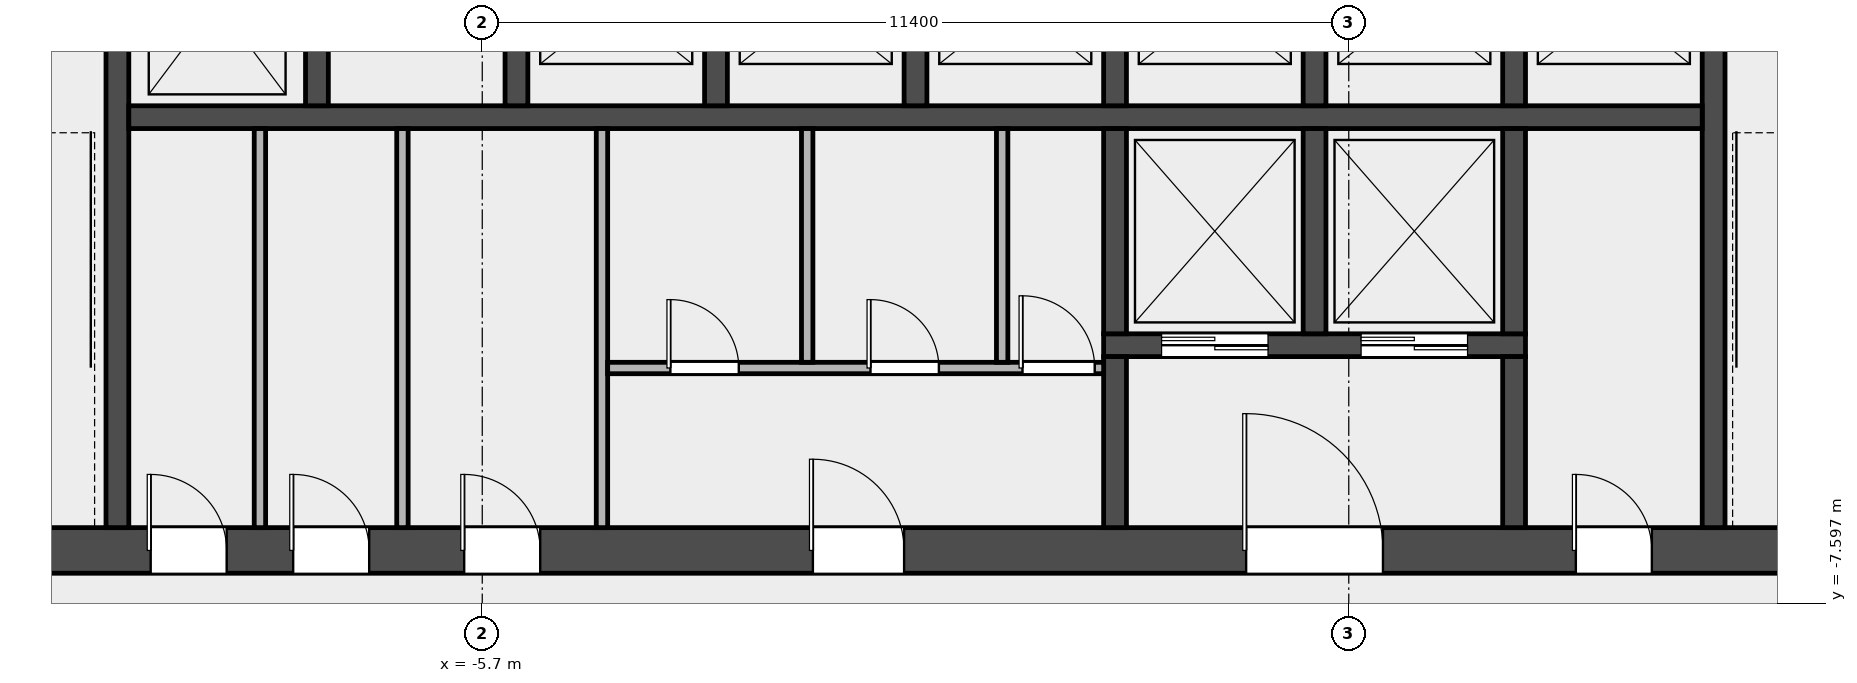
"""IFC4 building model, lengths in metres.
Left out: names, types, materials, properties, quantities, classifications, styles, units other than length and angle.
Written with IfcOpenShell. Run it as: python <this file> out.ifc"""

import sys

from ifc_helpers import new_model, si_unit, direction, frame, frame_2d, origin, place, context, subcontext, project, spatial, rectangle, extrude, element, fill, save


model = new_model("IFC4")
c1 = context("Model", 3, precision=1e-05, world=origin(), true_north=direction((0.0, 1.0)))
c2 = subcontext(c1, "Body", "Model", "MODEL_VIEW")
j1 = project(units=[si_unit("LENGTHUNIT", "METRE"), si_unit("PLANEANGLEUNIT", "RADIAN")], contexts=[c1])
p1 = place(None, origin())
s1 = spatial("IfcSite", under=j1, at=p1, CompositionType="ELEMENT")
p2 = place(p1, origin())
s2 = spatial("IfcBuilding", under=s1, at=p2, CompositionType="ELEMENT")
p3 = place(p2, frame((0.0, 0.0, 201.0)))
s3 = spatial("IfcBuildingStorey", under=s2, at=p3, CompositionType="ELEMENT", Elevation=201.0)
p4 = place(p3, frame((-14.4, -6.9, 0.0), z_axis=(0.0, 0.0, 1.0), x_axis=(1.0, 0.0, 0.0)))
e1 = element("IfcWall", 1, at=p4, inside=s3, PredefinedType="SHEAR", context=c2, shape_type="SweptSolid", body=[
    extrude(rectangle(XDim=28.8, YDim=0.6, at=frame_2d((14.4, 0.0))), origin(), (0.0, 0.0, 1.0), 3.7),
])
p5 = place(p4, frame((4.337, 0.0, 0.0)))
e2 = element("IfcOpeningElement", 2, at=p5, cuts=e1, PredefinedType="OPENING", context=c2, shape_type="SweptSolid", body=[
    extrude(rectangle(XDim=1.0, YDim=2.1, at=frame_2d((0.5, 1.05))), frame((0.0, 0.312, 0.0), z_axis=(0.0, -1.0, 0.0), x_axis=(1.0, 0.0, 0.0)), (0.0, 0.0, 1.0), 0.624),
])
p6 = place(p4, frame((6.212, 0.0, 0.0)))
e3 = element("IfcOpeningElement", 3, at=p6, cuts=e1, PredefinedType="OPENING", context=c2, shape_type="SweptSolid", body=[
    extrude(rectangle(XDim=1.0, YDim=2.1, at=frame_2d((0.5, 1.05))), frame((0.0, 0.312, 0.0), z_axis=(0.0, -1.0, 0.0), x_axis=(1.0, 0.0, 0.0)), (0.0, 0.0, 1.0), 0.624),
])
p7 = place(p4, frame((8.462, 0.0, 0.0)))
e4 = element("IfcOpeningElement", 4, at=p7, cuts=e1, PredefinedType="OPENING", context=c2, shape_type="SweptSolid", body=[
    extrude(rectangle(XDim=1.0, YDim=2.1, at=frame_2d((0.5, 1.05))), frame((0.0, 0.312, 0.0), z_axis=(0.0, -1.0, 0.0), x_axis=(1.0, 0.0, 0.0)), (0.0, 0.0, 1.0), 0.624),
])
p8 = place(p4, frame((13.05, 0.0, 0.0)))
e5 = element("IfcOpeningElement", 5, at=p8, cuts=e1, PredefinedType="OPENING", context=c2, shape_type="SweptSolid", body=[
    extrude(rectangle(XDim=1.2, YDim=2.1, at=frame_2d((0.6, 1.05))), frame((0.0, 0.312, 0.0), z_axis=(0.0, -1.0, 0.0), x_axis=(1.0, 0.0, 0.0)), (0.0, 0.0, 1.0), 0.624),
])
p9 = place(p4, frame((18.75, 0.0, 0.0)))
e6 = element("IfcOpeningElement", 6, at=p9, cuts=e1, PredefinedType="OPENING", context=c2, shape_type="SweptSolid", body=[
    extrude(rectangle(XDim=1.8, YDim=2.1, at=frame_2d((0.9, 1.05))), frame((0.0, 0.312, 0.0), z_axis=(0.0, -1.0, 0.0), x_axis=(1.0, 0.0, 0.0)), (0.0, 0.0, 1.0), 0.624),
])
p10 = place(p4, frame((23.087, 0.0, 0.0)))
e7 = element("IfcOpeningElement", 7, at=p10, cuts=e1, PredefinedType="OPENING", context=c2, shape_type="SweptSolid", body=[
    extrude(rectangle(XDim=1.0, YDim=2.1, at=frame_2d((0.5, 1.05))), frame((0.0, 0.312, 0.0), z_axis=(0.0, -1.0, 0.0), x_axis=(1.0, 0.0, 0.0)), (0.0, 0.0, 1.0), 0.624),
])
for number, where, z_axis, x_axis in (
    (8, (-10.5, -6.6, 0.0), (0.0, 0.0, 1.0), (0.0, 1.0, 0.0)),
    (9, (10.5, -6.6, 0.0), (0.0, 0.0, 1.0), (0.0, 1.0, 0.0)),
):
    element("IfcWall", number, at=place(p3, frame(where, z_axis=z_axis, x_axis=x_axis)), inside=s3, PredefinedType="SHEAR", context=c2, shape_type="SweptSolid", body=[
        extrude(rectangle(XDim=8.55, YDim=0.3, at=frame_2d((4.275, 0.0))), origin(), (0.0, 0.0, 1.0), 3.7),
    ])
p11 = place(p3, frame((-10.35, -1.2, 0.0), z_axis=(0.0, 0.0, 1.0), x_axis=(1.0, 0.0, 0.0)))
e10 = element("IfcWall", 10, at=p11, inside=s3, PredefinedType="SOLIDWALL", context=c2, shape_type="SweptSolid", body=[
    extrude(rectangle(XDim=20.7, YDim=0.3, at=frame_2d((10.35, 0.0))), origin(), (0.0, 0.0, 1.0), 3.7),
])
for number, where, z_axis, x_axis in (
    (11, (-7.875, -1.05, 0.0), (0.0, 0.0, 1.0), (0.0, 1.0, 0.0)),
    (12, (-5.25, -1.05, 0.0), (0.0, 0.0, 1.0), (0.0, 1.0, 0.0)),
    (13, (-2.625, -1.05, 0.0), (0.0, 0.0, 1.0), (0.0, 1.0, 0.0)),
    (14, (0.0, -1.05, 0.0), (0.0, 0.0, 1.0), (0.0, 1.0, 0.0)),
    (15, (2.625, -1.05, 0.0), (0.0, 0.0, 1.0), (0.0, 1.0, 0.0)),
    (16, (5.25, -1.05, 0.0), (0.0, 0.0, 1.0), (0.0, 1.0, 0.0)),
    (17, (7.875, -1.05, 0.0), (0.0, 0.0, 1.0), (0.0, 1.0, 0.0)),
):
    element("IfcWall", number, at=place(p3, frame(where, z_axis=z_axis, x_axis=x_axis)), inside=s3, PredefinedType="SOLIDWALL", context=c2, shape_type="SweptSolid", body=[
        extrude(rectangle(XDim=2.7, YDim=0.3, at=frame_2d((1.35, 0.0))), origin(), (0.0, 0.0, 1.0), 3.7),
    ])
p12 = place(p3, frame((2.475, -4.2, 0.0), z_axis=(0.0, 0.0, 1.0), x_axis=(1.0, 0.0, 0.0)))
e18 = element("IfcWall", 18, at=p12, inside=s3, PredefinedType="SOLIDWALL", context=c2, shape_type="SweptSolid", body=[
    extrude(rectangle(XDim=5.55, YDim=0.3, at=frame_2d((2.775, 0.0))), origin(), (0.0, 0.0, 1.0), 3.7),
])
p13 = place(p12, frame((0.762, 0.0, 0.0)))
e19 = element("IfcOpeningElement", 19, at=p13, cuts=e18, PredefinedType="OPENING", context=c2, shape_type="SweptSolid", body=[
    extrude(rectangle(XDim=1.4, YDim=2.1, at=frame_2d((0.7, 1.05))), frame((0.0, 0.162, 0.0), z_axis=(0.0, -1.0, 0.0), x_axis=(1.0, 0.0, 0.0)), (0.0, 0.0, 1.0), 0.324),
])
p14 = place(p12, frame((3.387, 0.0, 0.0)))
e20 = element("IfcOpeningElement", 20, at=p14, cuts=e18, PredefinedType="OPENING", context=c2, shape_type="SweptSolid", body=[
    extrude(rectangle(XDim=1.4, YDim=2.1, at=frame_2d((0.7, 1.05))), frame((0.0, 0.162, 0.0), z_axis=(0.0, -1.0, 0.0), x_axis=(1.0, 0.0, 0.0)), (0.0, 0.0, 1.0), 0.324),
])
p15 = place(p3, frame((2.625, -4.05, 0.0), z_axis=(0.0, 0.0, 1.0), x_axis=(0.0, 1.0, 0.0)))
e21 = element("IfcWall", 21, at=p15, inside=s3, PredefinedType="SOLIDWALL", context=c2, shape_type="SweptSolid", body=[
    extrude(rectangle(XDim=2.7, YDim=0.3, at=frame_2d((1.35, 0.0))), origin(), (0.0, 0.0, 1.0), 3.7),
])
p16 = place(p3, frame((2.625, -6.6, 0.0), z_axis=(0.0, 0.0, 1.0), x_axis=(0.0, 1.0, 0.0)))
e22 = element("IfcWall", 22, at=p16, inside=s3, PredefinedType="SOLIDWALL", context=c2, shape_type="SweptSolid", body=[
    extrude(rectangle(XDim=2.25, YDim=0.3, at=frame_2d((1.125, 0.0))), origin(), (0.0, 0.0, 1.0), 3.7),
])
for number, where, z_axis, x_axis in (
    (23, (5.25, -4.05, 0.0), (0.0, 0.0, 1.0), (0.0, 1.0, 0.0)),
    (24, (7.875, -4.05, 0.0), (0.0, 0.0, 1.0), (0.0, 1.0, 0.0)),
):
    element("IfcWall", number, at=place(p3, frame(where, z_axis=z_axis, x_axis=x_axis)), inside=s3, PredefinedType="SOLIDWALL", context=c2, shape_type="SweptSolid", body=[
        extrude(rectangle(XDim=2.7, YDim=0.3, at=frame_2d((1.35, 0.0))), origin(), (0.0, 0.0, 1.0), 3.7),
    ])
p17 = place(p3, frame((7.875, -6.6, 0.0), z_axis=(0.0, 0.0, 1.0), x_axis=(0.0, 1.0, 0.0)))
e25 = element("IfcWall", 25, at=p17, inside=s3, PredefinedType="SOLIDWALL", context=c2, shape_type="SweptSolid", body=[
    extrude(rectangle(XDim=2.25, YDim=0.3, at=frame_2d((1.125, 0.0))), origin(), (0.0, 0.0, 1.0), 3.7),
])
for number, where, z_axis, x_axis in (
    (26, (-8.625, -6.6, 0.0), (0.0, 0.0, 1.0), (0.0, 1.0, 0.0)),
    (27, (-6.75, -6.6, 0.0), (0.0, 0.0, 1.0), (0.0, 1.0, 0.0)),
    (28, (-4.125, -6.6, 0.0), (0.0, 0.0, 1.0), (0.0, 1.0, 0.0)),
):
    element("IfcWall", number, at=place(p3, frame(where, z_axis=z_axis, x_axis=x_axis)), inside=s3, PredefinedType="PARTITIONING", context=c2, shape_type="SweptSolid", body=[
        extrude(rectangle(XDim=5.25, YDim=0.15, at=frame_2d((2.625, 0.0))), origin(), (0.0, 0.0, 1.0), 3.7),
    ])
p18 = place(p3, frame((-4.05, -4.5, 0.0), z_axis=(0.0, 0.0, 1.0), x_axis=(1.0, 0.0, 0.0)))
e29 = element("IfcWall", 29, at=p18, inside=s3, PredefinedType="PARTITIONING", context=c2, shape_type="SweptSolid", body=[
    extrude(rectangle(XDim=6.525, YDim=0.15, at=frame_2d((3.263, 0.0))), origin(), (0.0, 0.0, 1.0), 3.7),
])
p19 = place(p18, frame((0.825, 0.0, 0.0)))
e30 = element("IfcOpeningElement", 30, at=p19, cuts=e29, PredefinedType="OPENING", context=c2, shape_type="SweptSolid", body=[
    extrude(rectangle(XDim=0.9, YDim=2.1, at=frame_2d((0.45, 1.05))), frame((0.0, 0.087, 0.0), z_axis=(0.0, -1.0, 0.0), x_axis=(1.0, 0.0, 0.0)), (0.0, 0.0, 1.0), 0.174),
])
p20 = place(p18, frame((3.458, 0.0, 0.0)))
e31 = element("IfcOpeningElement", 31, at=p20, cuts=e29, PredefinedType="OPENING", context=c2, shape_type="SweptSolid", body=[
    extrude(rectangle(XDim=0.9, YDim=2.1, at=frame_2d((0.45, 1.05))), frame((0.0, 0.087, 0.0), z_axis=(0.0, -1.0, 0.0), x_axis=(1.0, 0.0, 0.0)), (0.0, 0.0, 1.0), 0.174),
])
p21 = place(p18, frame((5.458, 0.0, 0.0)))
e32 = element("IfcOpeningElement", 32, at=p21, cuts=e29, PredefinedType="OPENING", context=c2, shape_type="SweptSolid", body=[
    extrude(rectangle(XDim=0.95, YDim=2.1, at=frame_2d((0.475, 1.05))), frame((0.0, 0.087, 0.0), z_axis=(0.0, -1.0, 0.0), x_axis=(1.0, 0.0, 0.0)), (0.0, 0.0, 1.0), 0.174),
])
for number, where, z_axis, x_axis in (
    (33, (-1.425, -4.425, 0.0), (0.0, 0.0, 1.0), (0.0, 1.0, 0.0)),
    (34, (1.14, -4.425, 0.0), (0.0, 0.0, 1.0), (0.0, 1.0, 0.0)),
):
    element("IfcWall", number, at=place(p3, frame(where, z_axis=z_axis, x_axis=x_axis)), inside=s3, PredefinedType="PARTITIONING", context=c2, shape_type="SweptSolid", body=[
        extrude(rectangle(XDim=3.075, YDim=0.15, at=frame_2d((1.538, 0.0))), origin(), (0.0, 0.0, 1.0), 3.7),
    ])
p22 = place(p13, origin())
e35 = element("IfcDoor", 35, at=p22, inside=s3, OperationType="DOUBLE_DOOR_SLIDING", PredefinedType="DOOR", context=c2, shape_type="SweptSolid", body=[
    extrude(rectangle(XDim=1.4, YDim=2.1, at=frame_2d((0.7, 1.05))), frame((0.0, 0.025, 0.0), z_axis=(0.0, -1.0, 0.0), x_axis=(1.0, 0.0, 0.0)), (0.0, 0.0, 1.0), 0.05),
])
fill(e19, e35)
p23 = place(p14, origin())
e36 = element("IfcDoor", 36, at=p23, inside=s3, OperationType="DOUBLE_DOOR_SLIDING", PredefinedType="DOOR", context=c2, shape_type="SweptSolid", body=[
    extrude(rectangle(XDim=1.4, YDim=2.1, at=frame_2d((0.7, 1.05))), frame((0.0, 0.025, 0.0), z_axis=(0.0, -1.0, 0.0), x_axis=(1.0, 0.0, 0.0)), (0.0, 0.0, 1.0), 0.05),
])
fill(e20, e36)
p24 = place(p5, origin())
e37 = element("IfcDoor", 37, at=p24, inside=s3, OperationType="SINGLE_SWING_LEFT", PredefinedType="DOOR", context=c2, shape_type="SweptSolid", body=[
    extrude(rectangle(XDim=1.0, YDim=2.1, at=frame_2d((0.5, 1.05))), frame((0.0, 0.025, 0.0), z_axis=(0.0, -1.0, 0.0), x_axis=(1.0, 0.0, 0.0)), (0.0, 0.0, 1.0), 0.05),
])
fill(e2, e37)
p25 = place(p6, origin())
e38 = element("IfcDoor", 38, at=p25, inside=s3, OperationType="SINGLE_SWING_LEFT", PredefinedType="DOOR", context=c2, shape_type="SweptSolid", body=[
    extrude(rectangle(XDim=1.0, YDim=2.1, at=frame_2d((0.5, 1.05))), frame((0.0, 0.025, 0.0), z_axis=(0.0, -1.0, 0.0), x_axis=(1.0, 0.0, 0.0)), (0.0, 0.0, 1.0), 0.05),
])
fill(e3, e38)
p26 = place(p7, origin())
e39 = element("IfcDoor", 39, at=p26, inside=s3, OperationType="SINGLE_SWING_LEFT", PredefinedType="DOOR", context=c2, shape_type="SweptSolid", body=[
    extrude(rectangle(XDim=1.0, YDim=2.1, at=frame_2d((0.5, 1.05))), frame((0.0, 0.025, 0.0), z_axis=(0.0, -1.0, 0.0), x_axis=(1.0, 0.0, 0.0)), (0.0, 0.0, 1.0), 0.05),
])
fill(e4, e39)
p27 = place(p8, origin())
e40 = element("IfcDoor", 40, at=p27, inside=s3, OperationType="SINGLE_SWING_LEFT", PredefinedType="DOOR", context=c2, shape_type="SweptSolid", body=[
    extrude(rectangle(XDim=1.2, YDim=2.1, at=frame_2d((0.6, 1.05))), frame((0.0, 0.025, 0.0), z_axis=(0.0, -1.0, 0.0), x_axis=(1.0, 0.0, 0.0)), (0.0, 0.0, 1.0), 0.05),
])
fill(e5, e40)
p28 = place(p19, origin())
e41 = element("IfcDoor", 41, at=p28, inside=s3, OperationType="SINGLE_SWING_LEFT", PredefinedType="DOOR", context=c2, shape_type="SweptSolid", body=[
    extrude(rectangle(XDim=0.9, YDim=2.1, at=frame_2d((0.45, 1.05))), frame((0.0, 0.025, 0.0), z_axis=(0.0, -1.0, 0.0), x_axis=(1.0, 0.0, 0.0)), (0.0, 0.0, 1.0), 0.05),
])
fill(e30, e41)
p29 = place(p20, origin())
e42 = element("IfcDoor", 42, at=p29, inside=s3, OperationType="SINGLE_SWING_LEFT", PredefinedType="DOOR", context=c2, shape_type="SweptSolid", body=[
    extrude(rectangle(XDim=0.9, YDim=2.1, at=frame_2d((0.45, 1.05))), frame((0.0, 0.025, 0.0), z_axis=(0.0, -1.0, 0.0), x_axis=(1.0, 0.0, 0.0)), (0.0, 0.0, 1.0), 0.05),
])
fill(e31, e42)
p30 = place(p21, origin())
e43 = element("IfcDoor", 43, at=p30, inside=s3, OperationType="SINGLE_SWING_LEFT", PredefinedType="DOOR", context=c2, shape_type="SweptSolid", body=[
    extrude(rectangle(XDim=0.95, YDim=2.1, at=frame_2d((0.475, 1.05))), frame((0.0, 0.025, 0.0), z_axis=(0.0, -1.0, 0.0), x_axis=(1.0, 0.0, 0.0)), (0.0, 0.0, 1.0), 0.05),
])
fill(e32, e43)
p31 = place(p9, origin())
e44 = element("IfcDoor", 44, at=p31, inside=s3, OperationType="DOUBLE_DOOR_SINGLE_SWING", PredefinedType="DOOR", context=c2, shape_type="SweptSolid", body=[
    extrude(rectangle(XDim=1.8, YDim=2.1, at=frame_2d((0.9, 1.05))), frame((0.0, 0.025, 0.0), z_axis=(0.0, -1.0, 0.0), x_axis=(1.0, 0.0, 0.0)), (0.0, 0.0, 1.0), 0.05),
])
fill(e6, e44)
p32 = place(p10, origin())
e45 = element("IfcDoor", 45, at=p32, inside=s3, OperationType="SINGLE_SWING_LEFT", PredefinedType="DOOR", context=c2, shape_type="SweptSolid", body=[
    extrude(rectangle(XDim=1.0, YDim=2.1, at=frame_2d((0.5, 1.05))), frame((0.0, 0.025, 0.0), z_axis=(0.0, -1.0, 0.0), x_axis=(1.0, 0.0, 0.0)), (0.0, 0.0, 1.0), 0.05),
])
fill(e7, e45)
save(model, sys.argv[1])
